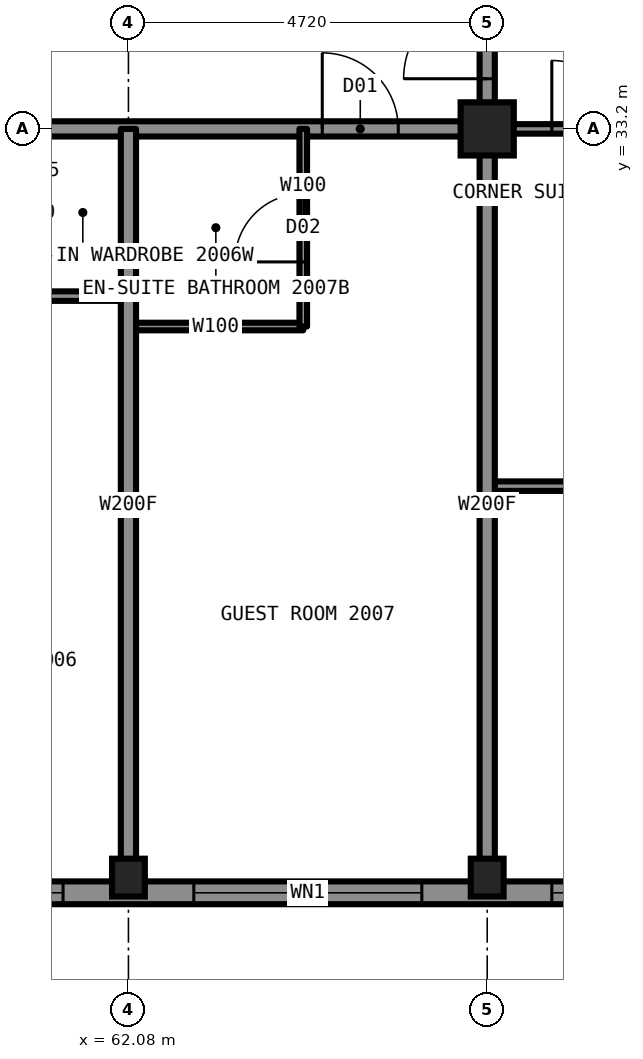
"""IFC4 building model, lengths in metres.
Left out: names, types, materials, properties, quantities, classifications, styles, units other than length and angle.
Written with IfcOpenShell. Run it as: python <this file> out.ifc"""

import sys

from ifc_helpers import new_model, si_unit, direction, frame, frame_2d, origin, origin_2d, place, context, subcontext, project, spatial, rectangle, hollow_rectangle, i_section, extrude, element, fill, save


model = new_model("IFC4")
c1 = context("Model", 3, precision=1e-05, world=origin(), true_north=direction((0.0, 1.0)))
c2 = subcontext(c1, "Body", "Model", "MODEL_VIEW")
j1 = project(units=[si_unit("LENGTHUNIT", "METRE"), si_unit("PLANEANGLEUNIT", "RADIAN")], contexts=[c1])
p1 = place(None, origin())
s1 = spatial("IfcSite", under=j1, at=p1, CompositionType="ELEMENT")
p2 = place(p1, origin())
s2 = spatial("IfcBuilding", under=s1, at=p2, CompositionType="ELEMENT")
p3 = place(p2, frame((0.0, 0.0, 70.5)))
s3 = spatial("IfcBuildingStorey", under=s2, at=p3, CompositionType="ELEMENT", Elevation=70.5)
for number, where, z_axis, x_axis in (
    (1, (62.08, 23.35, 0.0), (0.0, 0.0, 1.0), (1.0, 0.0, 0.0)),
    (2, (66.8, 23.35, 0.0), (0.0, 0.0, 1.0), (1.0, 0.0, 0.0)),
):
    element("IfcColumn", number, at=place(p3, frame(where, z_axis=z_axis, x_axis=x_axis)), inside=s3, PredefinedType="COLUMN", context=c2, shape_type="SweptSolid", body=[
        extrude(i_section(OverallWidth=0.432, OverallDepth=0.498, WebThickness=0.056, FlangeThickness=0.089, at=origin_2d()), origin(), (0.0, 0.0, 1.0), 3.5),
    ])
p4 = place(p3, frame((66.8, 33.2, 0.0), z_axis=(0.0, 0.0, 1.0), x_axis=(1.0, 0.0, 0.0)))
e3 = element("IfcColumn", 3, at=p4, inside=s3, PredefinedType="COLUMN", context=c2, shape_type="SweptSolid", body=[
    extrude(hollow_rectangle(XDim=0.7, YDim=0.7, WallThickness=0.06, at=origin_2d()), origin(), (0.0, 0.0, 1.0), 3.5),
])
p5 = place(p3, frame((43.2, 33.2, 0.0), z_axis=(0.0, 0.0, 1.0), x_axis=(1.0, 0.0, 0.0)))
e4 = element("IfcWall", 4, at=p5, inside=s3, PredefinedType="PARTITIONING", context=c2, shape_type="SweptSolid", body=[
    extrude(rectangle(XDim=23.6, YDim=0.2, at=frame_2d((11.8, 0.0))), origin(), (0.0, 0.0, 1.0), 3.33),
])
p6 = place(p5, frame((2.55, 0.0, 0.0)))
e5 = element("IfcOpeningElement", 5, at=p6, cuts=e4, PredefinedType="OPENING", context=c2, shape_type="SweptSolid", body=[
    extrude(rectangle(XDim=1.0, YDim=2.2, at=frame_2d((0.5, 1.1))), frame((0.0, 0.11, 0.0), z_axis=(0.0, -1.0, 0.0), x_axis=(1.0, 0.0, 0.0)), (0.0, 0.0, 1.0), 0.22),
])
p7 = place(p5, frame((5.12, 0.0, 0.0)))
e6 = element("IfcOpeningElement", 6, at=p7, cuts=e4, PredefinedType="OPENING", context=c2, shape_type="SweptSolid", body=[
    extrude(rectangle(XDim=1.0, YDim=2.2, at=frame_2d((0.5, 1.1))), frame((0.0, 0.11, 0.0), z_axis=(0.0, -1.0, 0.0), x_axis=(1.0, 0.0, 0.0)), (0.0, 0.0, 1.0), 0.22),
])
p8 = place(p5, frame((11.7, 0.0, 0.0)))
e7 = element("IfcOpeningElement", 7, at=p8, cuts=e4, PredefinedType="OPENING", context=c2, shape_type="SweptSolid", body=[
    extrude(rectangle(XDim=1.0, YDim=2.2, at=frame_2d((0.5, 1.1))), frame((0.0, 0.11, 0.0), z_axis=(0.0, -1.0, 0.0), x_axis=(1.0, 0.0, 0.0)), (0.0, 0.0, 1.0), 0.22),
])
p9 = place(p5, frame((16.42, 0.0, 0.0)))
e8 = element("IfcOpeningElement", 8, at=p9, cuts=e4, PredefinedType="OPENING", context=c2, shape_type="SweptSolid", body=[
    extrude(rectangle(XDim=1.0, YDim=2.2, at=frame_2d((0.5, 1.1))), frame((0.0, 0.11, 0.0), z_axis=(0.0, -1.0, 0.0), x_axis=(1.0, 0.0, 0.0)), (0.0, 0.0, 1.0), 0.22),
])
p10 = place(p5, frame((21.43, 0.0, 0.0)))
e9 = element("IfcOpeningElement", 9, at=p10, cuts=e4, PredefinedType="OPENING", context=c2, shape_type="SweptSolid", body=[
    extrude(rectangle(XDim=1.0, YDim=2.2, at=frame_2d((0.5, 1.1))), frame((0.0, 0.11, 0.0), z_axis=(0.0, -1.0, 0.0), x_axis=(1.0, 0.0, 0.0)), (0.0, 0.0, 1.0), 0.22),
])
p11 = place(p3, frame((66.8, 33.2, 0.0), z_axis=(0.0, 0.0, 1.0), x_axis=(1.0, 0.0, 0.0)))
e10 = element("IfcWall", 10, at=p11, inside=s3, PredefinedType="PARTITIONING", context=c2, shape_type="SweptSolid", body=[
    extrude(rectangle(XDim=9.9, YDim=0.125, at=frame_2d((4.95, 0.0))), origin(), (0.0, 0.0, 1.0), 2.573),
])
p12 = place(p11, frame((0.85, 0.0, 0.0)))
e11 = element("IfcOpeningElement", 11, at=p12, cuts=e10, PredefinedType="OPENING", context=c2, shape_type="SweptSolid", body=[
    extrude(rectangle(XDim=0.9, YDim=2.2, at=frame_2d((0.45, 1.1))), frame((0.0, 0.073, 0.0), z_axis=(0.0, -1.0, 0.0), x_axis=(1.0, 0.0, 0.0)), (0.0, 0.0, 1.0), 0.145),
])
p13 = place(p3, frame((60.88, 31.0, 0.0), z_axis=(0.0, 0.0, 1.0), x_axis=(1.0, 0.0, 0.0)))
e12 = element("IfcWall", 12, at=p13, inside=s3, PredefinedType="PARTITIONING", context=c2, shape_type="SweptSolid", body=[
    extrude(rectangle(XDim=1.2, YDim=0.125, at=frame_2d((0.6, 0.0))), origin(), (0.0, 0.0, 1.0), 3.33),
])
p14 = place(p3, frame((62.08, 30.6, 0.0), z_axis=(0.0, 0.0, 1.0), x_axis=(1.0, 0.0, 0.0)))
e13 = element("IfcWall", 13, at=p14, inside=s3, PredefinedType="PARTITIONING", context=c2, shape_type="SweptSolid", body=[
    extrude(rectangle(XDim=2.3, YDim=0.1, at=frame_2d((1.15, 0.0))), origin(), (0.0, 0.0, 1.0), 3.33),
])
p15 = place(p3, frame((66.8, 28.5, 0.0), z_axis=(0.0, 0.0, 1.0), x_axis=(1.0, 0.0, 0.0)))
e14 = element("IfcWall", 14, at=p15, inside=s3, PredefinedType="PARTITIONING", context=c2, shape_type="SweptSolid", body=[
    extrude(rectangle(XDim=9.894, YDim=0.125, at=frame_2d((4.947, 0.0))), origin(), (0.0, 0.0, 1.0), 3.33),
])
p16 = place(p15, frame((1.75, 0.0, 0.0)))
e15 = element("IfcOpeningElement", 15, at=p16, cuts=e14, PredefinedType="OPENING", context=c2, shape_type="SweptSolid", body=[
    extrude(rectangle(XDim=0.9, YDim=2.2, at=frame_2d((0.45, 1.1))), frame((0.0, 0.073, 0.0), z_axis=(0.0, -1.0, 0.0), x_axis=(1.0, 0.0, 0.0)), (0.0, 0.0, 1.0), 0.145),
])
p17 = place(p3, frame((66.8, 33.2, 0.0), z_axis=(0.0, 0.0, 1.0), x_axis=(0.0, 1.0, 0.0)))
e16 = element("IfcWall", 16, at=p17, inside=s3, PredefinedType="PARTITIONING", context=c2, shape_type="SweptSolid", body=[
    extrude(rectangle(XDim=23.6, YDim=0.2, at=frame_2d((11.8, 0.0))), origin(), (0.0, 0.0, 1.0), 3.33),
])
p18 = place(p17, frame((6.98, 0.0, 0.0)))
e17 = element("IfcOpeningElement", 17, at=p18, cuts=e16, PredefinedType="OPENING", context=c2, shape_type="SweptSolid", body=[
    extrude(rectangle(XDim=1.0, YDim=2.2, at=frame_2d((0.5, 1.1))), frame((0.0, 0.11, 0.0), z_axis=(0.0, -1.0, 0.0), x_axis=(1.0, 0.0, 0.0)), (0.0, 0.0, 1.0), 0.22),
])
p19 = place(p17, frame((12.44, 0.0, 0.0)))
e18 = element("IfcOpeningElement", 18, at=p19, cuts=e16, PredefinedType="OPENING", context=c2, shape_type="SweptSolid", body=[
    extrude(rectangle(XDim=1.0, YDim=2.2, at=frame_2d((0.5, 1.1))), frame((0.0, 0.11, 0.0), z_axis=(0.0, -1.0, 0.0), x_axis=(1.0, 0.0, 0.0)), (0.0, 0.0, 1.0), 0.22),
])
p20 = place(p17, frame((21.85, 0.0, 0.0)))
e19 = element("IfcOpeningElement", 19, at=p20, cuts=e16, PredefinedType="OPENING", context=c2, shape_type="SweptSolid", body=[
    extrude(rectangle(XDim=1.1, YDim=2.2, at=frame_2d((0.55, 1.1))), frame((0.0, 0.11, 0.0), z_axis=(0.0, -1.0, 0.0), x_axis=(1.0, 0.0, 0.0)), (0.0, 0.0, 1.0), 0.22),
])
p21 = place(p17, frame((0.66, 0.0, 0.0)))
e20 = element("IfcOpeningElement", 20, at=p21, cuts=e16, PredefinedType="OPENING", context=c2, shape_type="SweptSolid", body=[
    extrude(rectangle(XDim=1.1, YDim=2.2, at=frame_2d((0.55, 1.1))), frame((0.0, 0.11, 0.0), z_axis=(0.0, -1.0, 0.0), x_axis=(1.0, 0.0, 0.0)), (0.0, 0.0, 1.0), 0.22),
])
for number, where, z_axis, x_axis in (
    (21, (66.8, 23.3, 0.0), (0.0, 0.0, 1.0), (0.0, 1.0, 0.0)),
    (22, (62.08, 23.3, 0.0), (0.0, 0.0, 1.0), (0.0, 1.0, 0.0)),
):
    element("IfcWall", number, at=place(p3, frame(where, z_axis=z_axis, x_axis=x_axis)), inside=s3, PredefinedType="PARTITIONING", context=c2, shape_type="SweptSolid", body=[
        extrude(rectangle(XDim=9.9, YDim=0.2, at=frame_2d((4.95, 0.0))), origin(), (0.0, 0.0, 1.0), 2.573),
    ])
p22 = place(p3, frame((64.38, 30.6, 0.0), z_axis=(0.0, 0.0, 1.0), x_axis=(0.0, 1.0, 0.0)))
e23 = element("IfcWall", 23, at=p22, inside=s3, PredefinedType="PARTITIONING", context=c2, shape_type="SweptSolid", body=[
    extrude(rectangle(XDim=2.6, YDim=0.1, at=frame_2d((1.3, 0.0))), origin(), (0.0, 0.0, 1.0), 3.33),
])
p23 = place(p22, frame((0.85, 0.0, 0.0)))
e24 = element("IfcOpeningElement", 24, at=p23, cuts=e23, PredefinedType="OPENING", context=c2, shape_type="SweptSolid", body=[
    extrude(rectangle(XDim=0.9, YDim=2.1, at=frame_2d((0.45, 1.05))), frame((0.0, 0.06, 0.0), z_axis=(0.0, -1.0, 0.0), x_axis=(1.0, 0.0, 0.0)), (0.0, 0.0, 1.0), 0.12),
])
p24 = place(p3, frame((38.5, 23.15, 0.0), z_axis=(0.0, 0.0, 1.0), x_axis=(1.0, 0.0, 0.0)))
e25 = element("IfcWall", 25, at=p24, inside=s3, PredefinedType="SOLIDWALL", context=c2, shape_type="SweptSolid", body=[
    extrude(rectangle(XDim=33.0, YDim=0.3, at=frame_2d((16.5, 0.0))), origin(), (0.0, 0.0, 1.0), 2.83),
])
p25 = place(p24, frame((0.85, 0.0, 0.5)))
e26 = element("IfcOpeningElement", 26, at=p25, cuts=e25, PredefinedType="OPENING", context=c2, shape_type="SweptSolid", body=[
    extrude(rectangle(XDim=2.9, YDim=2.0, at=frame_2d((1.45, 1.0))), frame((0.0, 0.16, 0.0), z_axis=(0.0, -1.0, 0.0), x_axis=(1.0, 0.0, 0.0)), (0.0, 0.0, 1.0), 0.32),
])
p26 = place(p24, frame((6.96, 0.0, 0.55)))
e27 = element("IfcOpeningElement", 27, at=p26, cuts=e25, PredefinedType="OPENING", context=c2, shape_type="SweptSolid", body=[
    extrude(rectangle(XDim=1.6, YDim=1.9, at=frame_2d((0.8, 0.95))), frame((0.0, 0.16, 0.0), z_axis=(0.0, -1.0, 0.0), x_axis=(1.0, 0.0, 0.0)), (0.0, 0.0, 1.0), 0.32),
])
p27 = place(p24, frame((10.28, 0.0, 0.5)))
e28 = element("IfcOpeningElement", 28, at=p27, cuts=e25, PredefinedType="OPENING", context=c2, shape_type="SweptSolid", body=[
    extrude(rectangle(XDim=3.0, YDim=2.0, at=frame_2d((1.5, 1.0))), frame((0.0, 0.16, 0.0), z_axis=(0.0, -1.0, 0.0), x_axis=(1.0, 0.0, 0.0)), (0.0, 0.0, 1.0), 0.32),
])
p28 = place(p24, frame((15.0, 0.0, 0.5)))
e29 = element("IfcOpeningElement", 29, at=p28, cuts=e25, PredefinedType="OPENING", context=c2, shape_type="SweptSolid", body=[
    extrude(rectangle(XDim=3.0, YDim=2.0, at=frame_2d((1.5, 1.0))), frame((0.0, 0.16, 0.0), z_axis=(0.0, -1.0, 0.0), x_axis=(1.0, 0.0, 0.0)), (0.0, 0.0, 1.0), 0.32),
])
p29 = place(p24, frame((19.72, 0.0, 0.5)))
e30 = element("IfcOpeningElement", 30, at=p29, cuts=e25, PredefinedType="OPENING", context=c2, shape_type="SweptSolid", body=[
    extrude(rectangle(XDim=3.0, YDim=2.0, at=frame_2d((1.5, 1.0))), frame((0.0, 0.16, 0.0), z_axis=(0.0, -1.0, 0.0), x_axis=(1.0, 0.0, 0.0)), (0.0, 0.0, 1.0), 0.32),
])
p30 = place(p24, frame((24.44, 0.0, 0.55)))
e31 = element("IfcOpeningElement", 31, at=p30, cuts=e25, PredefinedType="OPENING", context=c2, shape_type="SweptSolid", body=[
    extrude(rectangle(XDim=1.6, YDim=1.9, at=frame_2d((0.8, 0.95))), frame((0.0, 0.16, 0.0), z_axis=(0.0, -1.0, 0.0), x_axis=(1.0, 0.0, 0.0)), (0.0, 0.0, 1.0), 0.32),
])
p31 = place(p24, frame((29.25, 0.0, 0.5)))
e32 = element("IfcOpeningElement", 32, at=p31, cuts=e25, PredefinedType="OPENING", context=c2, shape_type="SweptSolid", body=[
    extrude(rectangle(XDim=2.9, YDim=2.0, at=frame_2d((1.45, 1.0))), frame((0.0, 0.16, 0.0), z_axis=(0.0, -1.0, 0.0), x_axis=(1.0, 0.0, 0.0)), (0.0, 0.0, 1.0), 0.32),
])
p32 = place(p24, frame((6.31, 0.0, 1.45)))
e33 = element("IfcOpeningElement", 33, at=p32, cuts=e25, PredefinedType="OPENING", context=c2, shape_type="SweptSolid", body=[
    extrude(rectangle(XDim=0.6, YDim=1.0, at=frame_2d((0.3, 0.5))), frame((0.0, 0.16, 0.0), z_axis=(0.0, -1.0, 0.0), x_axis=(1.0, 0.0, 0.0)), (0.0, 0.0, 1.0), 0.32),
])
p33 = place(p24, frame((26.04, 0.0, 1.45)))
e34 = element("IfcOpeningElement", 34, at=p33, cuts=e25, PredefinedType="OPENING", context=c2, shape_type="SweptSolid", body=[
    extrude(rectangle(XDim=0.6, YDim=1.0, at=frame_2d((0.3, 0.5))), frame((0.0, 0.16, 0.0), z_axis=(0.0, -1.0, 0.0), x_axis=(1.0, 0.0, 0.0)), (0.0, 0.0, 1.0), 0.32),
])
p34 = place(p10, origin())
e35 = element("IfcDoor", 35, at=p34, inside=s3, OperationType="SINGLE_SWING_LEFT", PredefinedType="DOOR", context=c2, shape_type="SweptSolid", body=[
    extrude(rectangle(XDim=1.0, YDim=2.2, at=frame_2d((0.5, 1.1))), frame((0.0, 0.025, 0.0), z_axis=(0.0, -1.0, 0.0), x_axis=(1.0, 0.0, 0.0)), (0.0, 0.0, 1.0), 0.05),
])
fill(e9, e35)
p35 = place(p23, origin())
e36 = element("IfcDoor", 36, at=p35, inside=s3, OperationType="SINGLE_SWING_RIGHT", PredefinedType="DOOR", context=c2, shape_type="SweptSolid", body=[
    extrude(rectangle(XDim=0.9, YDim=2.1, at=frame_2d((0.45, 1.05))), frame((0.0, 0.025, 0.0), z_axis=(0.0, -1.0, 0.0), x_axis=(1.0, 0.0, 0.0)), (0.0, 0.0, 1.0), 0.05),
])
fill(e24, e36)
p36 = place(p12, origin())
e37 = element("IfcDoor", 37, at=p36, inside=s3, OperationType="SINGLE_SWING_LEFT", PredefinedType="DOOR", context=c2, shape_type="SweptSolid", body=[
    extrude(rectangle(XDim=0.9, YDim=2.2, at=frame_2d((0.45, 1.1))), frame((0.0, 0.025, 0.0), z_axis=(0.0, -1.0, 0.0), x_axis=(1.0, 0.0, 0.0)), (0.0, 0.0, 1.0), 0.05),
])
fill(e11, e37)
p37 = place(p21, origin())
e38 = element("IfcDoor", 38, at=p37, inside=s3, OperationType="SINGLE_SWING_LEFT", PredefinedType="DOOR", context=c2, shape_type="SweptSolid", body=[
    extrude(rectangle(XDim=1.1, YDim=2.2, at=frame_2d((0.55, 1.1))), frame((0.0, 0.025, 0.0), z_axis=(0.0, -1.0, 0.0), x_axis=(1.0, 0.0, 0.0)), (0.0, 0.0, 1.0), 0.05),
])
fill(e20, e38)
p38 = place(p29, origin())
e39 = element("IfcWindow", 39, at=p38, inside=s3, PartitioningType="SINGLE_PANEL", PredefinedType="WINDOW", context=c2, shape_type="SweptSolid", body=[
    extrude(rectangle(XDim=3.0, YDim=2.0, at=frame_2d((1.5, 1.0))), frame((0.0, 0.03, 0.0), z_axis=(0.0, -1.0, 0.0), x_axis=(1.0, 0.0, 0.0)), (0.0, 0.0, 1.0), 0.06),
])
fill(e30, e39)
p39 = place(p30, origin())
e40 = element("IfcWindow", 40, at=p39, inside=s3, PartitioningType="SINGLE_PANEL", PredefinedType="WINDOW", context=c2, shape_type="SweptSolid", body=[
    extrude(rectangle(XDim=1.6, YDim=1.9, at=frame_2d((0.8, 0.95))), frame((0.0, 0.03, 0.0), z_axis=(0.0, -1.0, 0.0), x_axis=(1.0, 0.0, 0.0)), (0.0, 0.0, 1.0), 0.06),
])
fill(e31, e40)
p40 = place(p31, origin())
e41 = element("IfcWindow", 41, at=p40, inside=s3, PartitioningType="SINGLE_PANEL", PredefinedType="WINDOW", context=c2, shape_type="SweptSolid", body=[
    extrude(rectangle(XDim=2.9, YDim=2.0, at=frame_2d((1.45, 1.0))), frame((0.0, 0.03, 0.0), z_axis=(0.0, -1.0, 0.0), x_axis=(1.0, 0.0, 0.0)), (0.0, 0.0, 1.0), 0.06),
])
fill(e32, e41)
p41 = place(p33, origin())
e42 = element("IfcWindow", 42, at=p41, inside=s3, PartitioningType="SINGLE_PANEL", PredefinedType="WINDOW", context=c2, shape_type="SweptSolid", body=[
    extrude(rectangle(XDim=0.6, YDim=1.0, at=frame_2d((0.3, 0.5))), frame((0.0, 0.03, 0.0), z_axis=(0.0, -1.0, 0.0), x_axis=(1.0, 0.0, 0.0)), (0.0, 0.0, 1.0), 0.06),
])
fill(e34, e42)
save(model, sys.argv[1])
